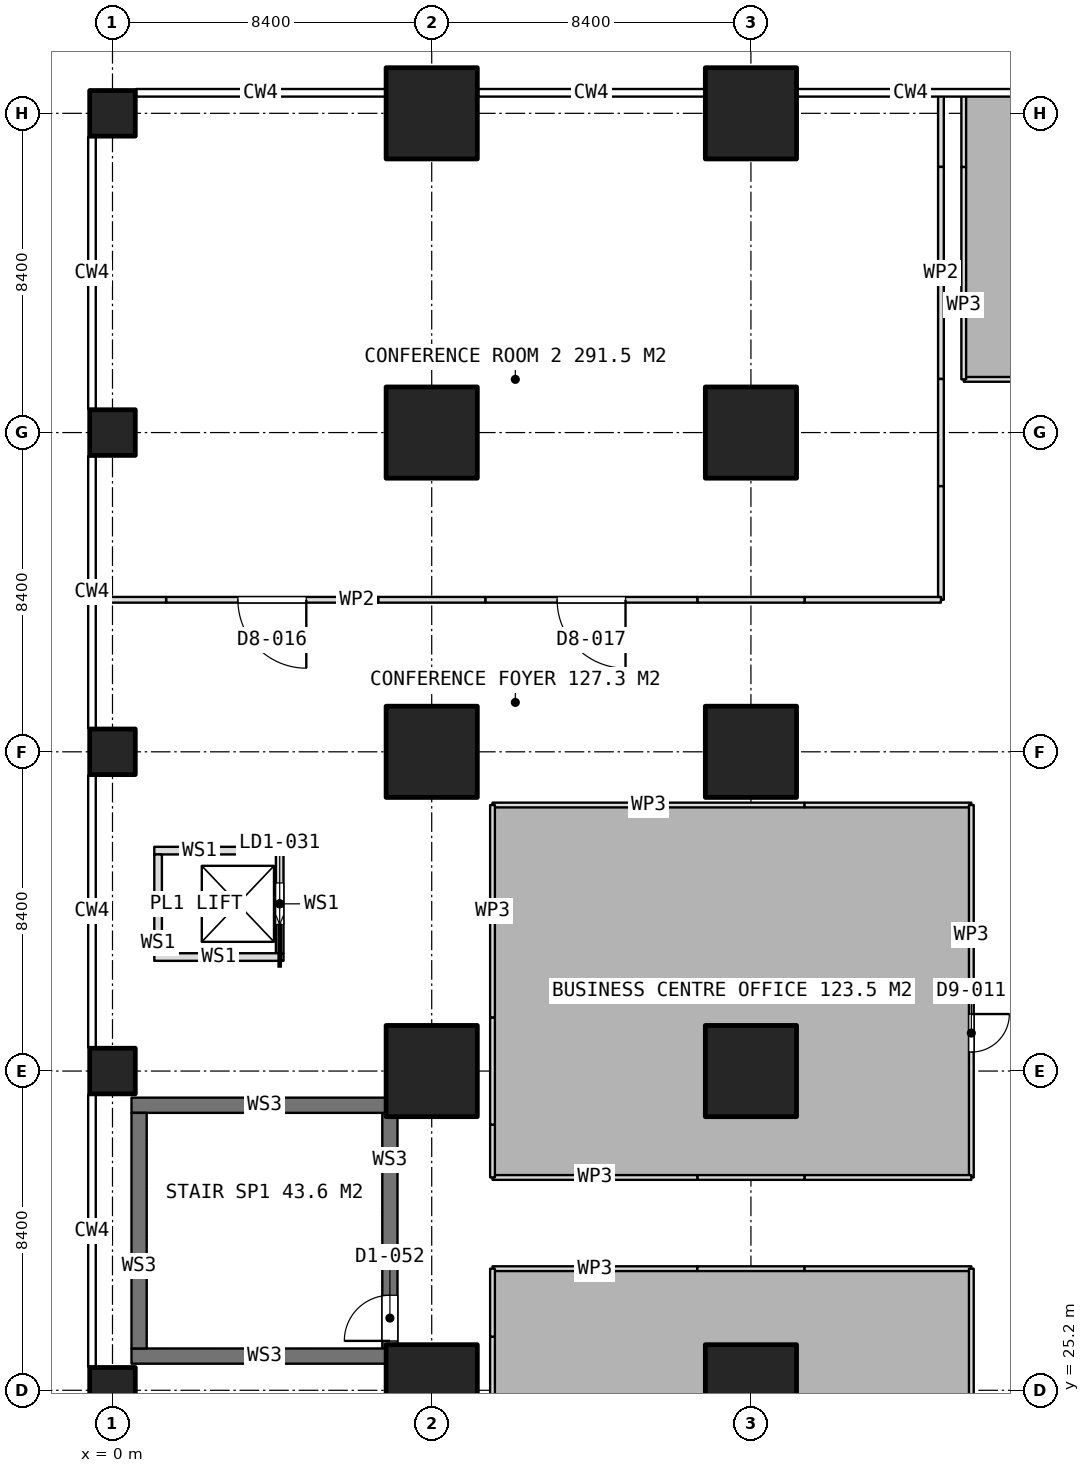
"""IFC4 building model, lengths in metres.
Left out: names, types, materials, properties, quantities, classifications, styles, units other than length and angle.
Written with IfcOpenShell. Run it as: python <this file> out.ifc"""

import sys

from ifc_helpers import new_model, si_unit, direction, frame, frame_2d, origin, origin_2d, place, context, subcontext, project, spatial, rectangle, extrude, element, fill, save


model = new_model("IFC4")
c1 = context("Model", 3, precision=1e-05, world=origin(), true_north=direction((0.0, 1.0)))
c2 = subcontext(c1, "Body", "Model", "MODEL_VIEW")
j1 = project(units=[si_unit("LENGTHUNIT", "METRE"), si_unit("PLANEANGLEUNIT", "RADIAN")], contexts=[c1])
p1 = place(None, origin())
s1 = spatial("IfcSite", under=j1, at=p1, CompositionType="ELEMENT")
p2 = place(p1, origin())
s2 = spatial("IfcBuilding", under=s1, at=p2, CompositionType="ELEMENT")
p3 = place(p2, frame((0.0, 0.0, 20.4)))
s3 = spatial("IfcBuildingStorey", under=s2, at=p3, CompositionType="ELEMENT", Elevation=20.4)
for number, where, z_axis, x_axis in (
    (1, (0.0, 25.2, 0.0), (0.0, 0.0, 1.0), (1.0, 0.0, 0.0)),
    (2, (0.0, 33.6, 0.0), (0.0, 0.0, 1.0), (1.0, 0.0, 0.0)),
    (3, (0.0, 42.0, 0.0), (0.0, 0.0, 1.0), (1.0, 0.0, 0.0)),
    (4, (0.0, 50.4, 0.0), (0.0, 0.0, 1.0), (1.0, 0.0, 0.0)),
    (5, (0.0, 58.8, 0.0), (0.0, 0.0, 1.0), (1.0, 0.0, 0.0)),
):
    element("IfcColumn", number, at=place(p3, frame(where, z_axis=z_axis, x_axis=x_axis)), inside=s3, PredefinedType="COLUMN", context=c2, shape_type="SweptSolid", body=[
        extrude(rectangle(XDim=1.2, YDim=1.2, at=origin_2d()), origin(), (0.0, 0.0, 1.0), 5.0),
    ])
for number, where, z_axis, x_axis in (
    (6, (8.4, 25.2, 0.0), (0.0, 0.0, 1.0), (1.0, 0.0, 0.0)),
    (7, (8.4, 33.6, 0.0), (0.0, 0.0, 1.0), (1.0, 0.0, 0.0)),
    (8, (8.4, 42.0, 0.0), (0.0, 0.0, 1.0), (1.0, 0.0, 0.0)),
    (9, (8.4, 50.4, 0.0), (0.0, 0.0, 1.0), (1.0, 0.0, 0.0)),
    (10, (8.4, 58.8, 0.0), (0.0, 0.0, 1.0), (1.0, 0.0, 0.0)),
    (11, (16.8, 25.2, 0.0), (0.0, 0.0, 1.0), (1.0, 0.0, 0.0)),
    (12, (16.8, 33.6, 0.0), (0.0, 0.0, 1.0), (1.0, 0.0, 0.0)),
    (13, (16.8, 42.0, 0.0), (0.0, 0.0, 1.0), (1.0, 0.0, 0.0)),
    (14, (16.8, 50.4, 0.0), (0.0, 0.0, 1.0), (1.0, 0.0, 0.0)),
    (15, (16.8, 58.8, 0.0), (0.0, 0.0, 1.0), (1.0, 0.0, 0.0)),
):
    element("IfcColumn", number, at=place(p3, frame(where, z_axis=z_axis, x_axis=x_axis)), inside=s3, PredefinedType="COLUMN", context=c2, shape_type="SweptSolid", body=[
        extrude(rectangle(XDim=2.4, YDim=2.4, at=origin_2d()), origin(), (0.0, 0.0, 1.0), 5.0),
    ])
for number, where, z_axis, x_axis in (
    (16, (0.5, 26.1, 0.0), (0.0, 0.0, 1.0), (1.0, 0.0, 0.0)),
    (17, (0.5, 32.7, 0.0), (0.0, 0.0, 1.0), (1.0, 0.0, 0.0)),
):
    element("IfcWall", number, at=place(p3, frame(where, z_axis=z_axis, x_axis=x_axis)), inside=s3, PredefinedType="SOLIDWALL", context=c2, shape_type="SweptSolid", body=[
        extrude(rectangle(XDim=7.0, YDim=0.4, at=frame_2d((3.5, 0.0))), origin(), (0.0, 0.0, 1.0), 2.8),
    ])
p4 = place(p3, frame((0.7, 26.3, 0.0), z_axis=(0.0, 0.0, 1.0), x_axis=(0.0, 1.0, 0.0)))
e18 = element("IfcWall", 18, at=p4, inside=s3, PredefinedType="SOLIDWALL", context=c2, shape_type="SweptSolid", body=[
    extrude(rectangle(XDim=6.2, YDim=0.4, at=frame_2d((3.1, 0.0))), origin(), (0.0, 0.0, 1.0), 2.8),
])
p5 = place(p3, frame((7.3, 26.3, 0.0), z_axis=(0.0, 0.0, 1.0), x_axis=(0.0, 1.0, 0.0)))
e19 = element("IfcWall", 19, at=p5, inside=s3, PredefinedType="SOLIDWALL", context=c2, shape_type="SweptSolid", body=[
    extrude(rectangle(XDim=6.2, YDim=0.4, at=frame_2d((3.1, 0.0))), origin(), (0.0, 0.0, 1.0), 2.8),
])
p6 = place(p5, frame((0.2, 0.0, 0.0)))
e20 = element("IfcOpeningElement", 20, at=p6, cuts=e19, PredefinedType="OPENING", context=c2, shape_type="SweptSolid", body=[
    extrude(rectangle(XDim=1.2, YDim=2.1, at=frame_2d((0.6, 1.05))), frame((0.0, 0.21, 0.0), z_axis=(0.0, -1.0, 0.0), x_axis=(1.0, 0.0, 0.0)), (0.0, 0.0, 1.0), 0.42),
])
for number, where, z_axis, x_axis in (
    (21, (1.1, 36.6, 0.0), (0.0, 0.0, 1.0), (1.0, 0.0, 0.0)),
    (22, (1.1, 39.4, 0.0), (0.0, 0.0, 1.0), (1.0, 0.0, 0.0)),
):
    element("IfcWall", number, at=place(p3, frame(where, z_axis=z_axis, x_axis=x_axis)), inside=s3, PredefinedType="PARTITIONING", context=c2, shape_type="SweptSolid", body=[
        extrude(rectangle(XDim=3.4, YDim=0.2, at=frame_2d((1.7, 0.0))), origin(), (0.0, 0.0, 1.0), 2.8),
    ])
p7 = place(p3, frame((1.2, 36.7, 0.0), z_axis=(0.0, 0.0, 1.0), x_axis=(0.0, 1.0, 0.0)))
e23 = element("IfcWall", 23, at=p7, inside=s3, PredefinedType="PARTITIONING", context=c2, shape_type="SweptSolid", body=[
    extrude(rectangle(XDim=2.6, YDim=0.2, at=frame_2d((1.3, 0.0))), origin(), (0.0, 0.0, 1.0), 2.8),
])
p8 = place(p3, frame((4.4, 36.7, 0.0), z_axis=(0.0, 0.0, 1.0), x_axis=(0.0, 1.0, 0.0)))
e24 = element("IfcWall", 24, at=p8, inside=s3, PredefinedType="PARTITIONING", context=c2, shape_type="SweptSolid", body=[
    extrude(rectangle(XDim=2.6, YDim=0.2, at=frame_2d((1.3, 0.0))), origin(), (0.0, 0.0, 1.0), 2.8),
])
p9 = place(p8, frame((0.75, 0.0, 0.0)))
e25 = element("IfcOpeningElement", 25, at=p9, cuts=e24, PredefinedType="OPENING", context=c2, shape_type="SweptSolid", body=[
    extrude(rectangle(XDim=1.1, YDim=2.1, at=frame_2d((0.55, 1.05))), frame((0.0, 0.11, 0.0), z_axis=(0.0, -1.0, 0.0), x_axis=(1.0, 0.0, 0.0)), (0.0, 0.0, 1.0), 0.22),
])
p10 = place(p3, frame((21.8, 59.29, 0.0), z_axis=(0.0, 0.0, 1.0), x_axis=(0.0, -1.0, 0.0)))
e26 = element("IfcWall", 26, at=p10, inside=s3, PredefinedType="PARTITIONING", context=c2, shape_type="SweptSolid", body=[
    extrude(rectangle(XDim=1.9, YDim=0.15, at=frame_2d((0.95, 0.0))), origin(), (0.0, 0.0, 1.0), 2.8),
])
p11 = place(p3, frame((21.8, 57.39, 0.0), z_axis=(0.0, 0.0, 1.0), x_axis=(0.0, -1.0, 0.0)))
e27 = element("IfcWall", 27, at=p11, inside=s3, PredefinedType="PARTITIONING", context=c2, shape_type="SweptSolid", body=[
    extrude(rectangle(XDim=5.58, YDim=0.15, at=frame_2d((2.79, 0.0))), origin(), (0.0, 0.0, 1.0), 4.6),
])
p12 = place(p3, frame((21.8, 51.81, 0.0), z_axis=(0.0, 0.0, 1.0), x_axis=(0.0, -1.0, 0.0)))
e28 = element("IfcWall", 28, at=p12, inside=s3, PredefinedType="PARTITIONING", context=c2, shape_type="SweptSolid", body=[
    extrude(rectangle(XDim=2.82, YDim=0.15, at=frame_2d((1.41, 0.0))), origin(), (0.0, 0.0, 1.0), 2.8),
])
p13 = place(p3, frame((21.8, 48.99, 0.0), z_axis=(0.0, 0.0, 1.0), x_axis=(0.0, -1.0, 0.0)))
e29 = element("IfcWall", 29, at=p13, inside=s3, PredefinedType="PARTITIONING", context=c2, shape_type="SweptSolid", body=[
    extrude(rectangle(XDim=2.99, YDim=0.15, at=frame_2d((1.495, 0.0))), origin(), (0.0, 0.0, 1.0), 4.6),
])
p14 = place(p3, frame((21.8, 46.0, 0.0), z_axis=(0.0, 0.0, 1.0), x_axis=(-1.0, 0.0, 0.0)))
e30 = element("IfcWall", 30, at=p14, inside=s3, PredefinedType="PARTITIONING", context=c2, shape_type="SweptSolid", body=[
    extrude(rectangle(XDim=3.59, YDim=0.15, at=frame_2d((1.795, 0.0))), origin(), (0.0, 0.0, 1.0), 4.6),
])
p15 = place(p3, frame((18.21, 46.0, 0.0), z_axis=(0.0, 0.0, 1.0), x_axis=(-1.0, 0.0, 0.0)))
e31 = element("IfcWall", 31, at=p15, inside=s3, PredefinedType="PARTITIONING", context=c2, shape_type="SweptSolid", body=[
    extrude(rectangle(XDim=2.82, YDim=0.15, at=frame_2d((1.41, 0.0))), origin(), (0.0, 0.0, 1.0), 2.8),
])
p16 = place(p3, frame((15.39, 46.0, 0.0), z_axis=(0.0, 0.0, 1.0), x_axis=(-1.0, 0.0, 0.0)))
e32 = element("IfcWall", 32, at=p16, inside=s3, PredefinedType="PARTITIONING", context=c2, shape_type="SweptSolid", body=[
    extrude(rectangle(XDim=5.58, YDim=0.15, at=frame_2d((2.79, 0.0))), origin(), (0.0, 0.0, 1.0), 4.6),
])
p17 = place(p16, frame((1.89, 0.0, 0.0)))
e33 = element("IfcOpeningElement", 33, at=p17, cuts=e32, PredefinedType="OPENING", context=c2, shape_type="SweptSolid", body=[
    extrude(rectangle(XDim=1.8, YDim=2.1, at=frame_2d((0.9, 1.05))), frame((0.0, 0.085, 0.0), z_axis=(0.0, -1.0, 0.0), x_axis=(1.0, 0.0, 0.0)), (0.0, 0.0, 1.0), 0.17),
])
p18 = place(p3, frame((9.81, 46.0, 0.0), z_axis=(0.0, 0.0, 1.0), x_axis=(-1.0, 0.0, 0.0)))
e34 = element("IfcWall", 34, at=p18, inside=s3, PredefinedType="PARTITIONING", context=c2, shape_type="SweptSolid", body=[
    extrude(rectangle(XDim=2.82, YDim=0.15, at=frame_2d((1.41, 0.0))), origin(), (0.0, 0.0, 1.0), 2.8),
])
p19 = place(p3, frame((6.99, 46.0, 0.0), z_axis=(0.0, 0.0, 1.0), x_axis=(-1.0, 0.0, 0.0)))
e35 = element("IfcWall", 35, at=p19, inside=s3, PredefinedType="PARTITIONING", context=c2, shape_type="SweptSolid", body=[
    extrude(rectangle(XDim=5.58, YDim=0.15, at=frame_2d((2.79, 0.0))), origin(), (0.0, 0.0, 1.0), 4.6),
])
p20 = place(p19, frame((1.89, 0.0, 0.0)))
e36 = element("IfcOpeningElement", 36, at=p20, cuts=e35, PredefinedType="OPENING", context=c2, shape_type="SweptSolid", body=[
    extrude(rectangle(XDim=1.8, YDim=2.1, at=frame_2d((0.9, 1.05))), frame((0.0, 0.085, 0.0), z_axis=(0.0, -1.0, 0.0), x_axis=(1.0, 0.0, 0.0)), (0.0, 0.0, 1.0), 0.17),
])
p21 = place(p3, frame((1.41, 46.0, 0.0), z_axis=(0.0, 0.0, 1.0), x_axis=(-1.0, 0.0, 0.0)))
e37 = element("IfcWall", 37, at=p21, inside=s3, PredefinedType="PARTITIONING", context=c2, shape_type="SweptSolid", body=[
    extrude(rectangle(XDim=1.9, YDim=0.15, at=frame_2d((0.95, 0.0))), origin(), (0.0, 0.0, 1.0), 2.8),
])
p22 = place(p3, frame((10.0, 28.4, 0.0), z_axis=(0.0, 0.0, 1.0), x_axis=(1.0, 0.0, 0.0)))
e38 = element("IfcWall", 38, at=p22, inside=s3, PredefinedType="PARTITIONING", context=c2, shape_type="SweptSolid", body=[
    extrude(rectangle(XDim=5.39, YDim=0.125, at=frame_2d((2.695, 0.0))), origin(), (0.0, 0.0, 1.0), 4.6),
])
p23 = place(p3, frame((15.39, 28.4, 0.0), z_axis=(0.0, 0.0, 1.0), x_axis=(1.0, 0.0, 0.0)))
e39 = element("IfcWall", 39, at=p23, inside=s3, PredefinedType="PARTITIONING", context=c2, shape_type="SweptSolid", body=[
    extrude(rectangle(XDim=2.82, YDim=0.125, at=frame_2d((1.41, 0.0))), origin(), (0.0, 0.0, 1.0), 2.8),
])
p24 = place(p3, frame((18.21, 28.4, 0.0), z_axis=(0.0, 0.0, 1.0), x_axis=(1.0, 0.0, 0.0)))
e40 = element("IfcWall", 40, at=p24, inside=s3, PredefinedType="PARTITIONING", context=c2, shape_type="SweptSolid", body=[
    extrude(rectangle(XDim=4.39, YDim=0.125, at=frame_2d((2.195, 0.0))), origin(), (0.0, 0.0, 1.0), 4.6),
])
p25 = place(p3, frame((22.6, 28.4, 0.0), z_axis=(0.0, 0.0, 1.0), x_axis=(0.0, -1.0, 0.0)))
e41 = element("IfcWall", 41, at=p25, inside=s3, PredefinedType="PARTITIONING", context=c2, shape_type="SweptSolid", body=[
    extrude(rectangle(XDim=9.8, YDim=0.125, at=frame_2d((4.9, 0.0))), origin(), (0.0, 0.0, 1.0), 4.6),
])
p26 = place(p25, frame((4.4, 0.0, 0.0)))
e42 = element("IfcOpeningElement", 42, at=p26, cuts=e41, PredefinedType="OPENING", context=c2, shape_type="SweptSolid", body=[
    extrude(rectangle(XDim=1.0, YDim=2.1, at=frame_2d((0.5, 1.05))), frame((0.0, 0.073, 0.0), z_axis=(0.0, -1.0, 0.0), x_axis=(1.0, 0.0, 0.0)), (0.0, 0.0, 1.0), 0.145),
])
p27 = place(p3, frame((10.0, 23.79, 0.0), z_axis=(0.0, 0.0, 1.0), x_axis=(0.0, 1.0, 0.0)))
e43 = element("IfcWall", 43, at=p27, inside=s3, PredefinedType="PARTITIONING", context=c2, shape_type="SweptSolid", body=[
    extrude(rectangle(XDim=2.82, YDim=0.125, at=frame_2d((1.41, 0.0))), origin(), (0.0, 0.0, 1.0), 2.8),
])
p28 = place(p3, frame((10.0, 26.61, 0.0), z_axis=(0.0, 0.0, 1.0), x_axis=(0.0, 1.0, 0.0)))
e44 = element("IfcWall", 44, at=p28, inside=s3, PredefinedType="PARTITIONING", context=c2, shape_type="SweptSolid", body=[
    extrude(rectangle(XDim=1.79, YDim=0.125, at=frame_2d((0.895, 0.0))), origin(), (0.0, 0.0, 1.0), 4.6),
])
p29 = place(p3, frame((10.0, 40.6, 0.0), z_axis=(0.0, 0.0, 1.0), x_axis=(1.0, 0.0, 0.0)))
e45 = element("IfcWall", 45, at=p29, inside=s3, PredefinedType="PARTITIONING", context=c2, shape_type="SweptSolid", body=[
    extrude(rectangle(XDim=8.21, YDim=0.125, at=frame_2d((4.105, 0.0))), origin(), (0.0, 0.0, 1.0), 2.8),
])
p30 = place(p3, frame((18.21, 40.6, 0.0), z_axis=(0.0, 0.0, 1.0), x_axis=(1.0, 0.0, 0.0)))
e46 = element("IfcWall", 46, at=p30, inside=s3, PredefinedType="PARTITIONING", context=c2, shape_type="SweptSolid", body=[
    extrude(rectangle(XDim=4.39, YDim=0.125, at=frame_2d((2.195, 0.0))), origin(), (0.0, 0.0, 1.0), 4.6),
])
p31 = place(p3, frame((22.6, 40.6, 0.0), z_axis=(0.0, 0.0, 1.0), x_axis=(0.0, -1.0, 0.0)))
e47 = element("IfcWall", 47, at=p31, inside=s3, PredefinedType="PARTITIONING", context=c2, shape_type="SweptSolid", body=[
    extrude(rectangle(XDim=9.8, YDim=0.125, at=frame_2d((4.9, 0.0))), origin(), (0.0, 0.0, 1.0), 4.6),
])
p32 = place(p31, frame((5.5, 0.0, 0.0)))
e48 = element("IfcOpeningElement", 48, at=p32, cuts=e47, PredefinedType="OPENING", context=c2, shape_type="SweptSolid", body=[
    extrude(rectangle(XDim=1.0, YDim=2.1, at=frame_2d((0.5, 1.05))), frame((0.0, 0.073, 0.0), z_axis=(0.0, -1.0, 0.0), x_axis=(1.0, 0.0, 0.0)), (0.0, 0.0, 1.0), 0.145),
])
p33 = place(p3, frame((22.6, 30.8, 0.0), z_axis=(0.0, 0.0, 1.0), x_axis=(-1.0, 0.0, 0.0)))
e49 = element("IfcWall", 49, at=p33, inside=s3, PredefinedType="PARTITIONING", context=c2, shape_type="SweptSolid", body=[
    extrude(rectangle(XDim=4.39, YDim=0.125, at=frame_2d((2.195, 0.0))), origin(), (0.0, 0.0, 1.0), 4.6),
])
p34 = place(p3, frame((18.21, 30.8, 0.0), z_axis=(0.0, 0.0, 1.0), x_axis=(-1.0, 0.0, 0.0)))
e50 = element("IfcWall", 50, at=p34, inside=s3, PredefinedType="PARTITIONING", context=c2, shape_type="SweptSolid", body=[
    extrude(rectangle(XDim=2.82, YDim=0.125, at=frame_2d((1.41, 0.0))), origin(), (0.0, 0.0, 1.0), 2.8),
])
p35 = place(p3, frame((15.39, 30.8, 0.0), z_axis=(0.0, 0.0, 1.0), x_axis=(-1.0, 0.0, 0.0)))
e51 = element("IfcWall", 51, at=p35, inside=s3, PredefinedType="PARTITIONING", context=c2, shape_type="SweptSolid", body=[
    extrude(rectangle(XDim=5.39, YDim=0.125, at=frame_2d((2.695, 0.0))), origin(), (0.0, 0.0, 1.0), 4.6),
])
p36 = place(p3, frame((10.0, 30.8, 0.0), z_axis=(0.0, 0.0, 1.0), x_axis=(0.0, 1.0, 0.0)))
e52 = element("IfcWall", 52, at=p36, inside=s3, PredefinedType="PARTITIONING", context=c2, shape_type="SweptSolid", body=[
    extrude(rectangle(XDim=1.39, YDim=0.125, at=frame_2d((0.695, 0.0))), origin(), (0.0, 0.0, 1.0), 4.6),
])
p37 = place(p3, frame((10.0, 32.19, 0.0), z_axis=(0.0, 0.0, 1.0), x_axis=(0.0, 1.0, 0.0)))
e53 = element("IfcWall", 53, at=p37, inside=s3, PredefinedType="PARTITIONING", context=c2, shape_type="SweptSolid", body=[
    extrude(rectangle(XDim=2.82, YDim=0.125, at=frame_2d((1.41, 0.0))), origin(), (0.0, 0.0, 1.0), 2.8),
])
p38 = place(p3, frame((10.0, 35.01, 0.0), z_axis=(0.0, 0.0, 1.0), x_axis=(0.0, 1.0, 0.0)))
e54 = element("IfcWall", 54, at=p38, inside=s3, PredefinedType="PARTITIONING", context=c2, shape_type="SweptSolid", body=[
    extrude(rectangle(XDim=5.59, YDim=0.125, at=frame_2d((2.795, 0.0))), origin(), (0.0, 0.0, 1.0), 2.8),
])
p39 = place(p3, frame((38.0, 51.8, 0.0), z_axis=(0.0, 0.0, 1.0), x_axis=(-1.0, 0.0, 0.0)))
e55 = element("IfcWall", 55, at=p39, inside=s3, PredefinedType="PARTITIONING", context=c2, shape_type="SweptSolid", body=[
    extrude(rectangle(XDim=15.6, YDim=0.125, at=frame_2d((7.8, 0.0))), origin(), (0.0, 0.0, 1.0), 2.8),
])
p40 = place(p39, frame((7.3, 0.0, 0.0)))
e56 = element("IfcOpeningElement", 56, at=p40, cuts=e55, PredefinedType="OPENING", context=c2, shape_type="SweptSolid", body=[
    extrude(rectangle(XDim=1.0, YDim=2.1, at=frame_2d((0.5, 1.05))), frame((0.0, 0.073, 0.0), z_axis=(0.0, -1.0, 0.0), x_axis=(1.0, 0.0, 0.0)), (0.0, 0.0, 1.0), 0.145),
])
p41 = place(p3, frame((22.4, 51.8, 0.0), z_axis=(0.0, 0.0, 1.0), x_axis=(0.0, 1.0, 0.0)))
e57 = element("IfcWall", 57, at=p41, inside=s3, PredefinedType="PARTITIONING", context=c2, shape_type="SweptSolid", body=[
    extrude(rectangle(XDim=5.59, YDim=0.125, at=frame_2d((2.795, 0.0))), origin(), (0.0, 0.0, 1.0), 2.8),
])
p42 = place(p3, frame((22.4, 57.39, 0.0), z_axis=(0.0, 0.0, 1.0), x_axis=(0.0, 1.0, 0.0)))
e58 = element("IfcWall", 58, at=p42, inside=s3, PredefinedType="PARTITIONING", context=c2, shape_type="SweptSolid", body=[
    extrude(rectangle(XDim=1.9, YDim=0.125, at=frame_2d((0.95, 0.0))), origin(), (0.0, 0.0, 1.0), 2.8),
])
p43 = place(p9, origin())
e59 = element("IfcDoor", 59, at=p43, inside=s3, OperationType="SLIDING_TO_LEFT", PredefinedType="USERDEFINED", context=c2, shape_type="SweptSolid", body=[
    extrude(rectangle(XDim=1.1, YDim=2.1, at=frame_2d((0.55, 1.05))), frame((0.0, 0.025, 0.0), z_axis=(0.0, -1.0, 0.0), x_axis=(1.0, 0.0, 0.0)), (0.0, 0.0, 1.0), 0.05),
])
fill(e25, e59)
p44 = place(p20, origin())
e60 = element("IfcDoor", 60, at=p44, inside=s3, OperationType="DOUBLE_DOOR_SINGLE_SWING", PredefinedType="DOOR", context=c2, shape_type="SweptSolid", body=[
    extrude(rectangle(XDim=1.8, YDim=2.1, at=frame_2d((0.9, 1.05))), frame((0.0, 0.025, 0.0), z_axis=(0.0, -1.0, 0.0), x_axis=(1.0, 0.0, 0.0)), (0.0, 0.0, 1.0), 0.05),
])
fill(e36, e60)
p45 = place(p17, origin())
e61 = element("IfcDoor", 61, at=p45, inside=s3, OperationType="DOUBLE_DOOR_SINGLE_SWING", PredefinedType="DOOR", context=c2, shape_type="SweptSolid", body=[
    extrude(rectangle(XDim=1.8, YDim=2.1, at=frame_2d((0.9, 1.05))), frame((0.0, 0.025, 0.0), z_axis=(0.0, -1.0, 0.0), x_axis=(1.0, 0.0, 0.0)), (0.0, 0.0, 1.0), 0.05),
])
fill(e33, e61)
p46 = place(p32, origin())
e62 = element("IfcDoor", 62, at=p46, inside=s3, OperationType="SINGLE_SWING_LEFT", PredefinedType="DOOR", context=c2, shape_type="SweptSolid", body=[
    extrude(rectangle(XDim=1.0, YDim=2.1, at=frame_2d((0.5, 1.05))), frame((0.0, 0.025, 0.0), z_axis=(0.0, -1.0, 0.0), x_axis=(1.0, 0.0, 0.0)), (0.0, 0.0, 1.0), 0.05),
])
fill(e48, e62)
p47 = place(p6, origin())
e63 = element("IfcDoor", 63, at=p47, inside=s3, OperationType="SINGLE_SWING_RIGHT", PredefinedType="DOOR", context=c2, shape_type="SweptSolid", body=[
    extrude(rectangle(XDim=1.2, YDim=2.1, at=frame_2d((0.6, 1.05))), frame((0.0, 0.025, 0.0), z_axis=(0.0, -1.0, 0.0), x_axis=(1.0, 0.0, 0.0)), (0.0, 0.0, 1.0), 0.05),
])
fill(e20, e63)
save(model, sys.argv[1])
